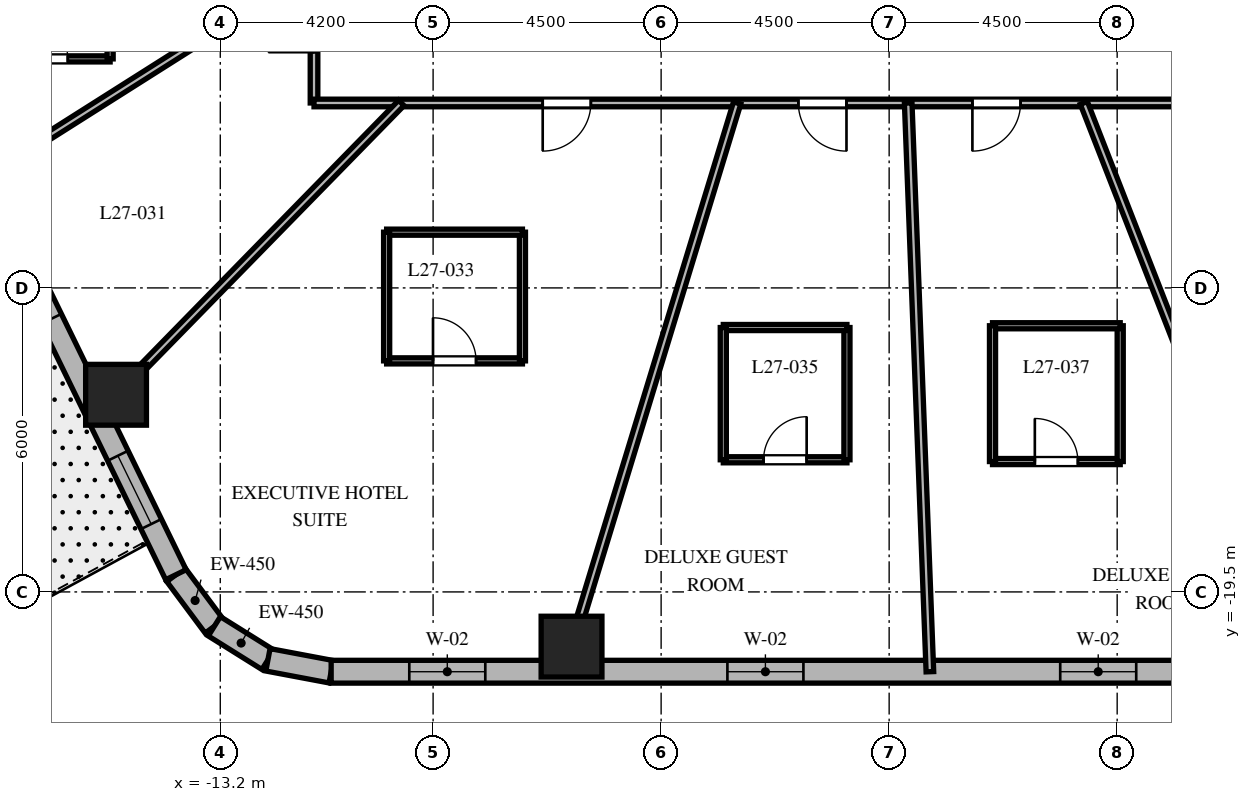
"""IFC4 building model, lengths in metres.
Left out: names, types, materials, properties, quantities, classifications, styles, units other than length and angle.
Written with IfcOpenShell. Run it as: python <this file> out.ifc"""

import sys

from ifc_helpers import new_model, si_unit, direction, frame, frame_2d, origin, origin_2d, place, context, subcontext, project, spatial, rectangle, extrude, element, fill, save


model = new_model("IFC4")
c1 = context("Model", 3, precision=1e-05, world=origin(), true_north=direction((0.0, 1.0)))
c2 = subcontext(c1, "Body", "Model", "MODEL_VIEW")
j1 = project(units=[si_unit("LENGTHUNIT", "METRE"), si_unit("PLANEANGLEUNIT", "RADIAN")], contexts=[c1])
p1 = place(None, origin())
s1 = spatial("IfcSite", under=j1, at=p1, CompositionType="ELEMENT")
p2 = place(p1, origin())
s2 = spatial("IfcBuilding", under=s1, at=p2, CompositionType="ELEMENT")
p3 = place(p2, frame((0.0, 0.0, 113.6)))
s3 = spatial("IfcBuildingStorey", under=s2, at=p3, CompositionType="ELEMENT", Elevation=113.6)
for number, where, z_axis, x_axis in (
    (1, (-6.268, -20.58, 0.0), (0.0, 0.0, 1.0), (1.0, 0.0, 0.0)),
    (2, (-15.257, -15.609, 0.0), (0.0, 0.0, 1.0), (1.0, 0.0, 0.0)),
):
    element("IfcColumn", number, at=place(p3, frame(where, z_axis=z_axis, x_axis=x_axis)), inside=s3, PredefinedType="COLUMN", context=c2, shape_type="SweptSolid", body=[
        extrude(rectangle(XDim=1.2, YDim=1.2, at=origin_2d()), origin(), (0.0, 0.0, 1.0), 3.7),
    ])
p4 = place(p3, frame((-14.076, -19.161, 0.0), z_axis=(0.0, 0.0, 1.0), x_axis=(0.597226657159, -0.802072515412, 0.0)))
e3 = element("IfcWall", 3, at=p4, inside=s3, PredefinedType="SOLIDWALL", context=c2, shape_type="SweptSolid", body=[
    extrude(rectangle(XDim=1.269, YDim=0.45, at=frame_2d((0.635, 0.0))), origin(), (0.0, 0.0, 1.0), 3.4),
])
p5 = place(p3, frame((-13.318, -20.179, 0.0), z_axis=(0.0, 0.0, 1.0), x_axis=(0.848031272749, -0.529946186362, 0.0)))
e4 = element("IfcWall", 4, at=p5, inside=s3, PredefinedType="SOLIDWALL", context=c2, shape_type="SweptSolid", body=[
    extrude(rectangle(XDim=1.248, YDim=0.45, at=frame_2d((0.624, 0.0))), origin(), (0.0, 0.0, 1.0), 3.4),
])
p6 = place(p3, frame((-12.259, -20.84, 0.0), z_axis=(0.0, 0.0, 1.0), x_axis=(0.982730354425, -0.185043374624, 0.0)))
e5 = element("IfcWall", 5, at=p6, inside=s3, PredefinedType="SOLIDWALL", context=c2, shape_type="SweptSolid", body=[
    extrude(rectangle(XDim=1.269, YDim=0.45, at=frame_2d((0.635, 0.0))), origin(), (0.0, 0.0, 1.0), 3.4),
])
p7 = place(p3, frame((-11.012, -21.075, 0.0), z_axis=(0.0, 0.0, 1.0), x_axis=(1.0, 0.0, 0.0)))
e6 = element("IfcWall", 6, at=p7, inside=s3, PredefinedType="SOLIDWALL", context=c2, shape_type="SweptSolid", body=[
    extrude(rectangle(XDim=23.782, YDim=0.45, at=frame_2d((11.891, 0.0))), origin(), (0.0, 0.0, 1.0), 3.4),
])
p8 = place(p7, frame((1.542, 0.0, 0.8)))
e7 = element("IfcOpeningElement", 7, at=p8, cuts=e6, PredefinedType="OPENING", context=c2, shape_type="SweptSolid", body=[
    extrude(rectangle(XDim=1.5, YDim=1.8, at=frame_2d((0.75, 0.9))), frame((0.0, 0.235, 0.0), z_axis=(0.0, -1.0, 0.0), x_axis=(1.0, 0.0, 0.0)), (0.0, 0.0, 1.0), 0.47),
])
p9 = place(p7, frame((7.82, 0.0, 0.8)))
e8 = element("IfcOpeningElement", 8, at=p9, cuts=e6, PredefinedType="OPENING", context=c2, shape_type="SweptSolid", body=[
    extrude(rectangle(XDim=1.5, YDim=1.8, at=frame_2d((0.75, 0.9))), frame((0.0, 0.235, 0.0), z_axis=(0.0, -1.0, 0.0), x_axis=(1.0, 0.0, 0.0)), (0.0, 0.0, 1.0), 0.47),
])
p10 = place(p7, frame((14.388, 0.0, 0.8)))
e9 = element("IfcOpeningElement", 9, at=p10, cuts=e6, PredefinedType="OPENING", context=c2, shape_type="SweptSolid", body=[
    extrude(rectangle(XDim=1.5, YDim=1.8, at=frame_2d((0.75, 0.9))), frame((0.0, 0.235, 0.0), z_axis=(0.0, -1.0, 0.0), x_axis=(1.0, 0.0, 0.0)), (0.0, 0.0, 1.0), 0.47),
])
p11 = place(p7, frame((20.741, 0.0, 0.8)))
e10 = element("IfcOpeningElement", 10, at=p11, cuts=e6, PredefinedType="OPENING", context=c2, shape_type="SweptSolid", body=[
    extrude(rectangle(XDim=1.5, YDim=1.8, at=frame_2d((0.75, 0.9))), frame((0.0, 0.235, 0.0), z_axis=(0.0, -1.0, 0.0), x_axis=(1.0, 0.0, 0.0)), (0.0, 0.0, 1.0), 0.47),
])
p12 = place(p3, frame((-22.238, -2.427, 0.0), z_axis=(0.0, 0.0, 1.0), x_axis=(0.438374803278, -0.898792262901, 0.0)))
e11 = element("IfcWall", 11, at=p12, inside=s3, PredefinedType="SOLIDWALL", context=c2, shape_type="SweptSolid", body=[
    extrude(rectangle(XDim=18.618, YDim=0.45, at=frame_2d((9.309, 0.0))), origin(), (0.0, 0.0, 1.0), 3.4),
])
p13 = place(p12, frame((4.62, 0.0, 0.0)))
e12 = element("IfcOpeningElement", 12, at=p13, cuts=e11, PredefinedType="OPENING", context=c2, shape_type="SweptSolid", body=[
    extrude(rectangle(XDim=0.95, YDim=2.15, at=frame_2d((0.475, 1.075))), frame((0.0, 0.235, 0.0), z_axis=(0.0, -1.0, 0.0), x_axis=(1.0, 0.0, 0.0)), (0.0, 0.0, 1.0), 0.47),
])
p14 = place(p12, frame((1.163, 0.0, 0.8)))
e13 = element("IfcOpeningElement", 13, at=p14, cuts=e11, PredefinedType="OPENING", context=c2, shape_type="SweptSolid", body=[
    extrude(rectangle(XDim=1.5, YDim=1.8, at=frame_2d((0.75, 0.9))), frame((0.0, 0.235, 0.0), z_axis=(0.0, -1.0, 0.0), x_axis=(1.0, 0.0, 0.0)), (0.0, 0.0, 1.0), 0.47),
])
p15 = place(p12, frame((6.262, 0.0, 0.8)))
e14 = element("IfcOpeningElement", 14, at=p15, cuts=e11, PredefinedType="OPENING", context=c2, shape_type="SweptSolid", body=[
    extrude(rectangle(XDim=1.5, YDim=1.8, at=frame_2d((0.75, 0.9))), frame((0.0, 0.235, 0.0), z_axis=(0.0, -1.0, 0.0), x_axis=(1.0, 0.0, 0.0)), (0.0, 0.0, 1.0), 0.47),
])
p16 = place(p12, frame((11.501, 0.0, 0.8)))
e15 = element("IfcOpeningElement", 15, at=p16, cuts=e11, PredefinedType="OPENING", context=c2, shape_type="SweptSolid", body=[
    extrude(rectangle(XDim=1.5, YDim=1.8, at=frame_2d((0.75, 0.9))), frame((0.0, 0.235, 0.0), z_axis=(0.0, -1.0, 0.0), x_axis=(1.0, 0.0, 0.0)), (0.0, 0.0, 1.0), 0.47),
])
p17 = place(p12, frame((16.006, 0.0, 0.8)))
e16 = element("IfcOpeningElement", 16, at=p17, cuts=e11, PredefinedType="OPENING", context=c2, shape_type="SweptSolid", body=[
    extrude(rectangle(XDim=1.5, YDim=1.8, at=frame_2d((0.75, 0.9))), frame((0.0, 0.235, 0.0), z_axis=(0.0, -1.0, 0.0), x_axis=(1.0, 0.0, 0.0)), (0.0, 0.0, 1.0), 0.47),
])
p18 = place(p3, frame((-11.35, -9.85, 0.0), z_axis=(0.0, 0.0, 1.0), x_axis=(0.0, 1.0, 0.0)))
e17 = element("IfcWall", 17, at=p18, inside=s3, PredefinedType="PARTITIONING", context=c2, shape_type="SweptSolid", body=[
    extrude(rectangle(XDim=19.7, YDim=0.15, at=frame_2d((9.85, 0.0))), origin(), (0.0, 0.0, 1.0), 2.84),
])
p19 = place(p18, frame((17.197, 0.0, 0.0)))
e18 = element("IfcOpeningElement", 18, at=p19, cuts=e17, PredefinedType="OPENING", context=c2, shape_type="SweptSolid", body=[
    extrude(rectangle(XDim=0.9, YDim=2.03, at=frame_2d((0.45, 1.015))), frame((0.0, 0.085, 0.0), z_axis=(0.0, -1.0, 0.0), x_axis=(1.0, 0.0, 0.0)), (0.0, 0.0, 1.0), 0.17),
])
p20 = place(p18, frame((13.408, 0.0, 0.0)))
e19 = element("IfcOpeningElement", 19, at=p20, cuts=e17, PredefinedType="OPENING", context=c2, shape_type="SweptSolid", body=[
    extrude(rectangle(XDim=0.95, YDim=2.03, at=frame_2d((0.475, 1.015))), frame((0.0, 0.085, 0.0), z_axis=(0.0, -1.0, 0.0), x_axis=(1.0, 0.0, 0.0)), (0.0, 0.0, 1.0), 0.17),
])
p21 = place(p18, frame((8.836, 0.0, 0.0)))
e20 = element("IfcOpeningElement", 20, at=p21, cuts=e17, PredefinedType="OPENING", context=c2, shape_type="SweptSolid", body=[
    extrude(rectangle(XDim=0.95, YDim=2.03, at=frame_2d((0.475, 1.015))), frame((0.0, 0.085, 0.0), z_axis=(0.0, -1.0, 0.0), x_axis=(1.0, 0.0, 0.0)), (0.0, 0.0, 1.0), 0.17),
])
p22 = place(p18, frame((4.199, 0.0, 0.0)))
e21 = element("IfcOpeningElement", 21, at=p22, cuts=e17, PredefinedType="OPENING", context=c2, shape_type="SweptSolid", body=[
    extrude(rectangle(XDim=0.95, YDim=2.03, at=frame_2d((0.475, 1.015))), frame((0.0, 0.085, 0.0), z_axis=(0.0, -1.0, 0.0), x_axis=(1.0, 0.0, 0.0)), (0.0, 0.0, 1.0), 0.17),
])
p23 = place(p18, frame((1.002, 0.0, 0.0)))
e22 = element("IfcOpeningElement", 22, at=p23, cuts=e17, PredefinedType="OPENING", context=c2, shape_type="SweptSolid", body=[
    extrude(rectangle(XDim=0.9, YDim=2.03, at=frame_2d((0.45, 1.015))), frame((0.0, 0.085, 0.0), z_axis=(0.0, -1.0, 0.0), x_axis=(1.0, 0.0, 0.0)), (0.0, 0.0, 1.0), 0.17),
])
p24 = place(p3, frame((11.35, -9.85, 0.0), z_axis=(0.0, 0.0, 1.0), x_axis=(-1.0, 0.0, 0.0)))
e23 = element("IfcWall", 23, at=p24, inside=s3, PredefinedType="PARTITIONING", context=c2, shape_type="SweptSolid", body=[
    extrude(rectangle(XDim=22.7, YDim=0.15, at=frame_2d((11.35, 0.0))), origin(), (0.0, 0.0, 1.0), 2.84),
])
p25 = place(p24, frame((17.237, 0.0, 0.0)))
e24 = element("IfcOpeningElement", 24, at=p25, cuts=e23, PredefinedType="OPENING", context=c2, shape_type="SweptSolid", body=[
    extrude(rectangle(XDim=0.95, YDim=2.03, at=frame_2d((0.475, 1.015))), frame((0.0, 0.085, 0.0), z_axis=(0.0, -1.0, 0.0), x_axis=(1.0, 0.0, 0.0)), (0.0, 0.0, 1.0), 0.17),
])
p26 = place(p24, frame((12.192, 0.0, 0.0)))
e25 = element("IfcOpeningElement", 25, at=p26, cuts=e23, PredefinedType="OPENING", context=c2, shape_type="SweptSolid", body=[
    extrude(rectangle(XDim=0.95, YDim=2.03, at=frame_2d((0.475, 1.015))), frame((0.0, 0.085, 0.0), z_axis=(0.0, -1.0, 0.0), x_axis=(1.0, 0.0, 0.0)), (0.0, 0.0, 1.0), 0.17),
])
p27 = place(p24, frame((8.757, 0.0, 0.0)))
e26 = element("IfcOpeningElement", 26, at=p27, cuts=e23, PredefinedType="OPENING", context=c2, shape_type="SweptSolid", body=[
    extrude(rectangle(XDim=0.95, YDim=2.03, at=frame_2d((0.475, 1.015))), frame((0.0, 0.085, 0.0), z_axis=(0.0, -1.0, 0.0), x_axis=(1.0, 0.0, 0.0)), (0.0, 0.0, 1.0), 0.17),
])
p28 = place(p24, frame((3.399, 0.0, 0.0)))
e27 = element("IfcOpeningElement", 27, at=p28, cuts=e23, PredefinedType="OPENING", context=c2, shape_type="SweptSolid", body=[
    extrude(rectangle(XDim=0.95, YDim=2.03, at=frame_2d((0.475, 1.015))), frame((0.0, 0.085, 0.0), z_axis=(0.0, -1.0, 0.0), x_axis=(1.0, 0.0, 0.0)), (0.0, 0.0, 1.0), 0.17),
])
p29 = place(p3, frame((-11.35, -7.185, 0.0), z_axis=(0.0, 0.0, 1.0), x_axis=(-0.844928274737, -0.534879622485, 0.0)))
e28 = element("IfcWall", 28, at=p29, inside=s3, PredefinedType="PARTITIONING", context=c2, shape_type="SweptSolid", body=[
    extrude(rectangle(XDim=7.747, YDim=0.15, at=frame_2d((3.874, 0.0))), origin(), (0.0, 0.0, 1.0), 2.54),
])
p30 = place(p3, frame((-9.628, -9.85, 0.0), z_axis=(0.0, 0.0, 1.0), x_axis=(-0.698992824326, -0.715128681805, 0.0)))
e29 = element("IfcWall", 29, at=p30, inside=s3, PredefinedType="PARTITIONING", context=c2, shape_type="SweptSolid", body=[
    extrude(rectangle(XDim=8.579, YDim=0.15, at=frame_2d((4.29, 0.0))), origin(), (0.0, 0.0, 1.0), 2.54),
])
p31 = place(p3, frame((-3.0, -9.85, 0.0), z_axis=(0.0, 0.0, 1.0), x_axis=(-0.291352035382, -0.95661590593, 0.0)))
e30 = element("IfcWall", 30, at=p31, inside=s3, PredefinedType="PARTITIONING", context=c2, shape_type="SweptSolid", body=[
    extrude(rectangle(XDim=11.734, YDim=0.15, at=frame_2d((5.867, 0.0))), origin(), (0.0, 0.0, 1.0), 2.54),
])
p32 = place(p3, frame((0.376, -9.85, 0.0), z_axis=(0.0, 0.0, 1.0), x_axis=(0.03812177869, -0.999273100804, 0.0)))
e31 = element("IfcWall", 31, at=p32, inside=s3, PredefinedType="PARTITIONING", context=c2, shape_type="SweptSolid", body=[
    extrude(rectangle(XDim=11.233, YDim=0.15, at=frame_2d((5.616, 0.0))), origin(), (0.0, 0.0, 1.0), 2.54),
])
p33 = place(p3, frame((3.842, -9.85, 0.0), z_axis=(0.0, 0.0, 1.0), x_axis=(0.363432685593, -0.931620460833, 0.0)))
e32 = element("IfcWall", 32, at=p33, inside=s3, PredefinedType="PARTITIONING", context=c2, shape_type="SweptSolid", body=[
    extrude(rectangle(XDim=12.049, YDim=0.15, at=frame_2d((6.024, 0.0))), origin(), (0.0, 0.0, 1.0), 2.54),
])
p34 = place(p3, frame((-17.894, -8.98, 0.0), z_axis=(0.0, 0.0, 1.0), x_axis=(1.0, 0.0, 0.0)))
e33 = element("IfcWall", 33, at=p34, inside=s3, PredefinedType="PARTITIONING", context=c2, shape_type="SweptSolid", body=[
    extrude(rectangle(XDim=2.52, YDim=0.12, at=frame_2d((1.26, 0.0))), origin(), (0.0, 0.0, 1.0), 3.4),
])
p35 = place(p34, frame((0.835, 0.0, 0.0)))
e34 = element("IfcOpeningElement", 34, at=p35, cuts=e33, PredefinedType="OPENING", context=c2, shape_type="SweptSolid", body=[
    extrude(rectangle(XDim=0.85, YDim=2.03, at=frame_2d((0.425, 1.015))), frame((0.0, 0.07, 0.0), z_axis=(0.0, -1.0, 0.0), x_axis=(1.0, 0.0, 0.0)), (0.0, 0.0, 1.0), 0.14),
])
p36 = place(p3, frame((-15.374, -8.98, 0.0), z_axis=(0.0, 0.0, 1.0), x_axis=(0.0, 1.0, 0.0)))
e35 = element("IfcWall", 35, at=p36, inside=s3, PredefinedType="PARTITIONING", context=c2, shape_type="SweptSolid", body=[
    extrude(rectangle(XDim=2.68, YDim=0.12, at=frame_2d((1.34, 0.0))), origin(), (0.0, 0.0, 1.0), 2.84),
])
p37 = place(p3, frame((-9.917, -14.94, 0.0), z_axis=(0.0, 0.0, 1.0), x_axis=(1.0, 0.0, 0.0)))
e36 = element("IfcWall", 36, at=p37, inside=s3, PredefinedType="PARTITIONING", context=c2, shape_type="SweptSolid", body=[
    extrude(rectangle(XDim=2.68, YDim=0.12, at=frame_2d((1.34, 0.0))), origin(), (0.0, 0.0, 1.0), 2.972),
])
p38 = place(p37, frame((0.915, 0.0, 0.0)))
e37 = element("IfcOpeningElement", 37, at=p38, cuts=e36, PredefinedType="OPENING", context=c2, shape_type="SweptSolid", body=[
    extrude(rectangle(XDim=0.85, YDim=2.03, at=frame_2d((0.425, 1.015))), frame((0.0, 0.07, 0.0), z_axis=(0.0, -1.0, 0.0), x_axis=(1.0, 0.0, 0.0)), (0.0, 0.0, 1.0), 0.14),
])
p39 = place(p3, frame((-7.237, -14.94, 0.0), z_axis=(0.0, 0.0, 1.0), x_axis=(0.0, 1.0, 0.0)))
e38 = element("IfcWall", 38, at=p39, inside=s3, PredefinedType="PARTITIONING", context=c2, shape_type="SweptSolid", body=[
    extrude(rectangle(XDim=2.54, YDim=0.12, at=frame_2d((1.27, 0.0))), origin(), (0.0, 0.0, 1.0), 2.84),
])
p40 = place(p3, frame((-7.237, -12.4, 0.0), z_axis=(0.0, 0.0, 1.0), x_axis=(-1.0, 0.0, 0.0)))
e39 = element("IfcWall", 39, at=p40, inside=s3, PredefinedType="PARTITIONING", context=c2, shape_type="SweptSolid", body=[
    extrude(rectangle(XDim=2.68, YDim=0.12, at=frame_2d((1.34, 0.0))), origin(), (0.0, 0.0, 1.0), 2.84),
])
p41 = place(p3, frame((-9.917, -12.4, 0.0), z_axis=(0.0, 0.0, 1.0), x_axis=(0.0, -1.0, 0.0)))
e40 = element("IfcWall", 40, at=p41, inside=s3, PredefinedType="PARTITIONING", context=c2, shape_type="SweptSolid", body=[
    extrude(rectangle(XDim=2.54, YDim=0.12, at=frame_2d((1.27, 0.0))), origin(), (0.0, 0.0, 1.0), 2.972),
])
p42 = place(p3, frame((-3.273, -16.892, 0.0), z_axis=(0.0, 0.0, 1.0), x_axis=(1.0, 0.0, 0.0)))
e41 = element("IfcWall", 41, at=p42, inside=s3, PredefinedType="PARTITIONING", context=c2, shape_type="SweptSolid", body=[
    extrude(rectangle(XDim=2.44, YDim=0.12, at=frame_2d((1.22, 0.0))), origin(), (0.0, 0.0, 1.0), 3.4),
])
p43 = place(p42, frame((0.795, 0.0, 0.0)))
e42 = element("IfcOpeningElement", 42, at=p43, cuts=e41, PredefinedType="OPENING", context=c2, shape_type="SweptSolid", body=[
    extrude(rectangle(XDim=0.85, YDim=2.03, at=frame_2d((0.425, 1.015))), frame((0.0, 0.07, 0.0), z_axis=(0.0, -1.0, 0.0), x_axis=(1.0, 0.0, 0.0)), (0.0, 0.0, 1.0), 0.14),
])
p44 = place(p3, frame((-0.833, -16.892, 0.0), z_axis=(0.0, 0.0, 1.0), x_axis=(0.0, 1.0, 0.0)))
e43 = element("IfcWall", 43, at=p44, inside=s3, PredefinedType="PARTITIONING", context=c2, shape_type="SweptSolid", body=[
    extrude(rectangle(XDim=2.61, YDim=0.12, at=frame_2d((1.305, 0.0))), origin(), (0.0, 0.0, 1.0), 2.84),
])
p45 = place(p3, frame((-0.833, -14.282, 0.0), z_axis=(0.0, 0.0, 1.0), x_axis=(-1.0, 0.0, 0.0)))
e44 = element("IfcWall", 44, at=p45, inside=s3, PredefinedType="PARTITIONING", context=c2, shape_type="SweptSolid", body=[
    extrude(rectangle(XDim=2.44, YDim=0.12, at=frame_2d((1.22, 0.0))), origin(), (0.0, 0.0, 1.0), 3.4),
])
p46 = place(p3, frame((-3.273, -14.282, 0.0), z_axis=(0.0, 0.0, 1.0), x_axis=(0.0, -1.0, 0.0)))
e45 = element("IfcWall", 45, at=p46, inside=s3, PredefinedType="PARTITIONING", context=c2, shape_type="SweptSolid", body=[
    extrude(rectangle(XDim=2.61, YDim=0.12, at=frame_2d((1.305, 0.0))), origin(), (0.0, 0.0, 1.0), 2.84),
])
p47 = place(p3, frame((2.04, -16.927, 0.0), z_axis=(0.0, 0.0, 1.0), x_axis=(1.0, 0.0, 0.0)))
e46 = element("IfcWall", 46, at=p47, inside=s3, PredefinedType="PARTITIONING", context=c2, shape_type="SweptSolid", body=[
    extrude(rectangle(XDim=2.52, YDim=0.12, at=frame_2d((1.26, 0.0))), origin(), (0.0, 0.0, 1.0), 3.4),
])
p48 = place(p47, frame((0.835, 0.0, 0.0)))
e47 = element("IfcOpeningElement", 47, at=p48, cuts=e46, PredefinedType="OPENING", context=c2, shape_type="SweptSolid", body=[
    extrude(rectangle(XDim=0.85, YDim=2.03, at=frame_2d((0.425, 1.015))), frame((0.0, 0.07, 0.0), z_axis=(0.0, -1.0, 0.0), x_axis=(1.0, 0.0, 0.0)), (0.0, 0.0, 1.0), 0.14),
])
p49 = place(p3, frame((4.56, -16.927, 0.0), z_axis=(0.0, 0.0, 1.0), x_axis=(0.0, 1.0, 0.0)))
e48 = element("IfcWall", 48, at=p49, inside=s3, PredefinedType="PARTITIONING", context=c2, shape_type="SweptSolid", body=[
    extrude(rectangle(XDim=2.68, YDim=0.12, at=frame_2d((1.34, 0.0))), origin(), (0.0, 0.0, 1.0), 2.84),
])
p50 = place(p3, frame((4.56, -14.247, 0.0), z_axis=(0.0, 0.0, 1.0), x_axis=(-1.0, 0.0, 0.0)))
e49 = element("IfcWall", 49, at=p50, inside=s3, PredefinedType="PARTITIONING", context=c2, shape_type="SweptSolid", body=[
    extrude(rectangle(XDim=2.52, YDim=0.12, at=frame_2d((1.26, 0.0))), origin(), (0.0, 0.0, 1.0), 3.4),
])
p51 = place(p3, frame((2.04, -14.247, 0.0), z_axis=(0.0, 0.0, 1.0), x_axis=(0.0, -1.0, 0.0)))
e50 = element("IfcWall", 50, at=p51, inside=s3, PredefinedType="PARTITIONING", context=c2, shape_type="SweptSolid", body=[
    extrude(rectangle(XDim=2.68, YDim=0.12, at=frame_2d((1.34, 0.0))), origin(), (0.0, 0.0, 1.0), 2.84),
])
p52 = place(p8, origin())
e51 = element("IfcWindow", 51, at=p52, inside=s3, PartitioningType="SINGLE_PANEL", PredefinedType="WINDOW", context=c2, shape_type="SweptSolid", body=[
    extrude(rectangle(XDim=1.5, YDim=1.8, at=frame_2d((0.75, 0.9))), frame((0.0, 0.03, 0.0), z_axis=(0.0, -1.0, 0.0), x_axis=(1.0, 0.0, 0.0)), (0.0, 0.0, 1.0), 0.06),
])
fill(e7, e51)
p53 = place(p9, origin())
e52 = element("IfcWindow", 52, at=p53, inside=s3, PartitioningType="SINGLE_PANEL", PredefinedType="WINDOW", context=c2, shape_type="SweptSolid", body=[
    extrude(rectangle(XDim=1.5, YDim=1.8, at=frame_2d((0.75, 0.9))), frame((0.0, 0.03, 0.0), z_axis=(0.0, -1.0, 0.0), x_axis=(1.0, 0.0, 0.0)), (0.0, 0.0, 1.0), 0.06),
])
fill(e8, e52)
p54 = place(p10, origin())
e53 = element("IfcWindow", 53, at=p54, inside=s3, PartitioningType="SINGLE_PANEL", PredefinedType="WINDOW", context=c2, shape_type="SweptSolid", body=[
    extrude(rectangle(XDim=1.5, YDim=1.8, at=frame_2d((0.75, 0.9))), frame((0.0, 0.03, 0.0), z_axis=(0.0, -1.0, 0.0), x_axis=(1.0, 0.0, 0.0)), (0.0, 0.0, 1.0), 0.06),
])
fill(e9, e53)
p55 = place(p16, origin())
e54 = element("IfcWindow", 54, at=p55, inside=s3, PartitioningType="SINGLE_PANEL", PredefinedType="WINDOW", context=c2, shape_type="SweptSolid", body=[
    extrude(rectangle(XDim=1.5, YDim=1.8, at=frame_2d((0.75, 0.9))), frame((0.0, 0.03, 0.0), z_axis=(0.0, -1.0, 0.0), x_axis=(1.0, 0.0, 0.0)), (0.0, 0.0, 1.0), 0.06),
])
fill(e15, e54)
p56 = place(p17, origin())
e55 = element("IfcWindow", 55, at=p56, inside=s3, PartitioningType="SINGLE_PANEL", PredefinedType="WINDOW", context=c2, shape_type="SweptSolid", body=[
    extrude(rectangle(XDim=1.5, YDim=1.8, at=frame_2d((0.75, 0.9))), frame((0.0, 0.03, 0.0), z_axis=(0.0, -1.0, 0.0), x_axis=(1.0, 0.0, 0.0)), (0.0, 0.0, 1.0), 0.06),
])
fill(e16, e55)
p57 = place(p35, origin())
e56 = element("IfcDoor", 56, at=p57, inside=s3, OperationType="SINGLE_SWING_LEFT", PredefinedType="DOOR", context=c2, shape_type="SweptSolid", body=[
    extrude(rectangle(XDim=0.85, YDim=2.03, at=frame_2d((0.425, 1.015))), frame((0.0, 0.025, 0.0), z_axis=(0.0, -1.0, 0.0), x_axis=(1.0, 0.0, 0.0)), (0.0, 0.0, 1.0), 0.05),
])
fill(e34, e56)
p58 = place(p25, origin())
e57 = element("IfcDoor", 57, at=p58, inside=s3, OperationType="SINGLE_SWING_RIGHT", PredefinedType="DOOR", context=c2, shape_type="SweptSolid", body=[
    extrude(rectangle(XDim=0.95, YDim=2.03, at=frame_2d((0.475, 1.015))), frame((0.0, 0.025, 0.0), z_axis=(0.0, -1.0, 0.0), x_axis=(1.0, 0.0, 0.0)), (0.0, 0.0, 1.0), 0.05),
])
fill(e24, e57)
p59 = place(p38, origin())
e58 = element("IfcDoor", 58, at=p59, inside=s3, OperationType="SINGLE_SWING_LEFT", PredefinedType="DOOR", context=c2, shape_type="SweptSolid", body=[
    extrude(rectangle(XDim=0.85, YDim=2.03, at=frame_2d((0.425, 1.015))), frame((0.0, 0.025, 0.0), z_axis=(0.0, -1.0, 0.0), x_axis=(1.0, 0.0, 0.0)), (0.0, 0.0, 1.0), 0.05),
])
fill(e37, e58)
p60 = place(p26, origin())
e59 = element("IfcDoor", 59, at=p60, inside=s3, OperationType="SINGLE_SWING_LEFT", PredefinedType="DOOR", context=c2, shape_type="SweptSolid", body=[
    extrude(rectangle(XDim=0.95, YDim=2.03, at=frame_2d((0.475, 1.015))), frame((0.0, 0.025, 0.0), z_axis=(0.0, -1.0, 0.0), x_axis=(1.0, 0.0, 0.0)), (0.0, 0.0, 1.0), 0.05),
])
fill(e25, e59)
p61 = place(p43, origin())
e60 = element("IfcDoor", 60, at=p61, inside=s3, OperationType="SINGLE_SWING_RIGHT", PredefinedType="DOOR", context=c2, shape_type="SweptSolid", body=[
    extrude(rectangle(XDim=0.85, YDim=2.03, at=frame_2d((0.425, 1.015))), frame((0.0, 0.025, 0.0), z_axis=(0.0, -1.0, 0.0), x_axis=(1.0, 0.0, 0.0)), (0.0, 0.0, 1.0), 0.05),
])
fill(e42, e60)
p62 = place(p27, origin())
e61 = element("IfcDoor", 61, at=p62, inside=s3, OperationType="SINGLE_SWING_RIGHT", PredefinedType="DOOR", context=c2, shape_type="SweptSolid", body=[
    extrude(rectangle(XDim=0.95, YDim=2.03, at=frame_2d((0.475, 1.015))), frame((0.0, 0.025, 0.0), z_axis=(0.0, -1.0, 0.0), x_axis=(1.0, 0.0, 0.0)), (0.0, 0.0, 1.0), 0.05),
])
fill(e26, e61)
p63 = place(p48, origin())
e62 = element("IfcDoor", 62, at=p63, inside=s3, OperationType="SINGLE_SWING_LEFT", PredefinedType="DOOR", context=c2, shape_type="SweptSolid", body=[
    extrude(rectangle(XDim=0.85, YDim=2.03, at=frame_2d((0.425, 1.015))), frame((0.0, 0.025, 0.0), z_axis=(0.0, -1.0, 0.0), x_axis=(1.0, 0.0, 0.0)), (0.0, 0.0, 1.0), 0.05),
])
fill(e47, e62)
save(model, sys.argv[1])
